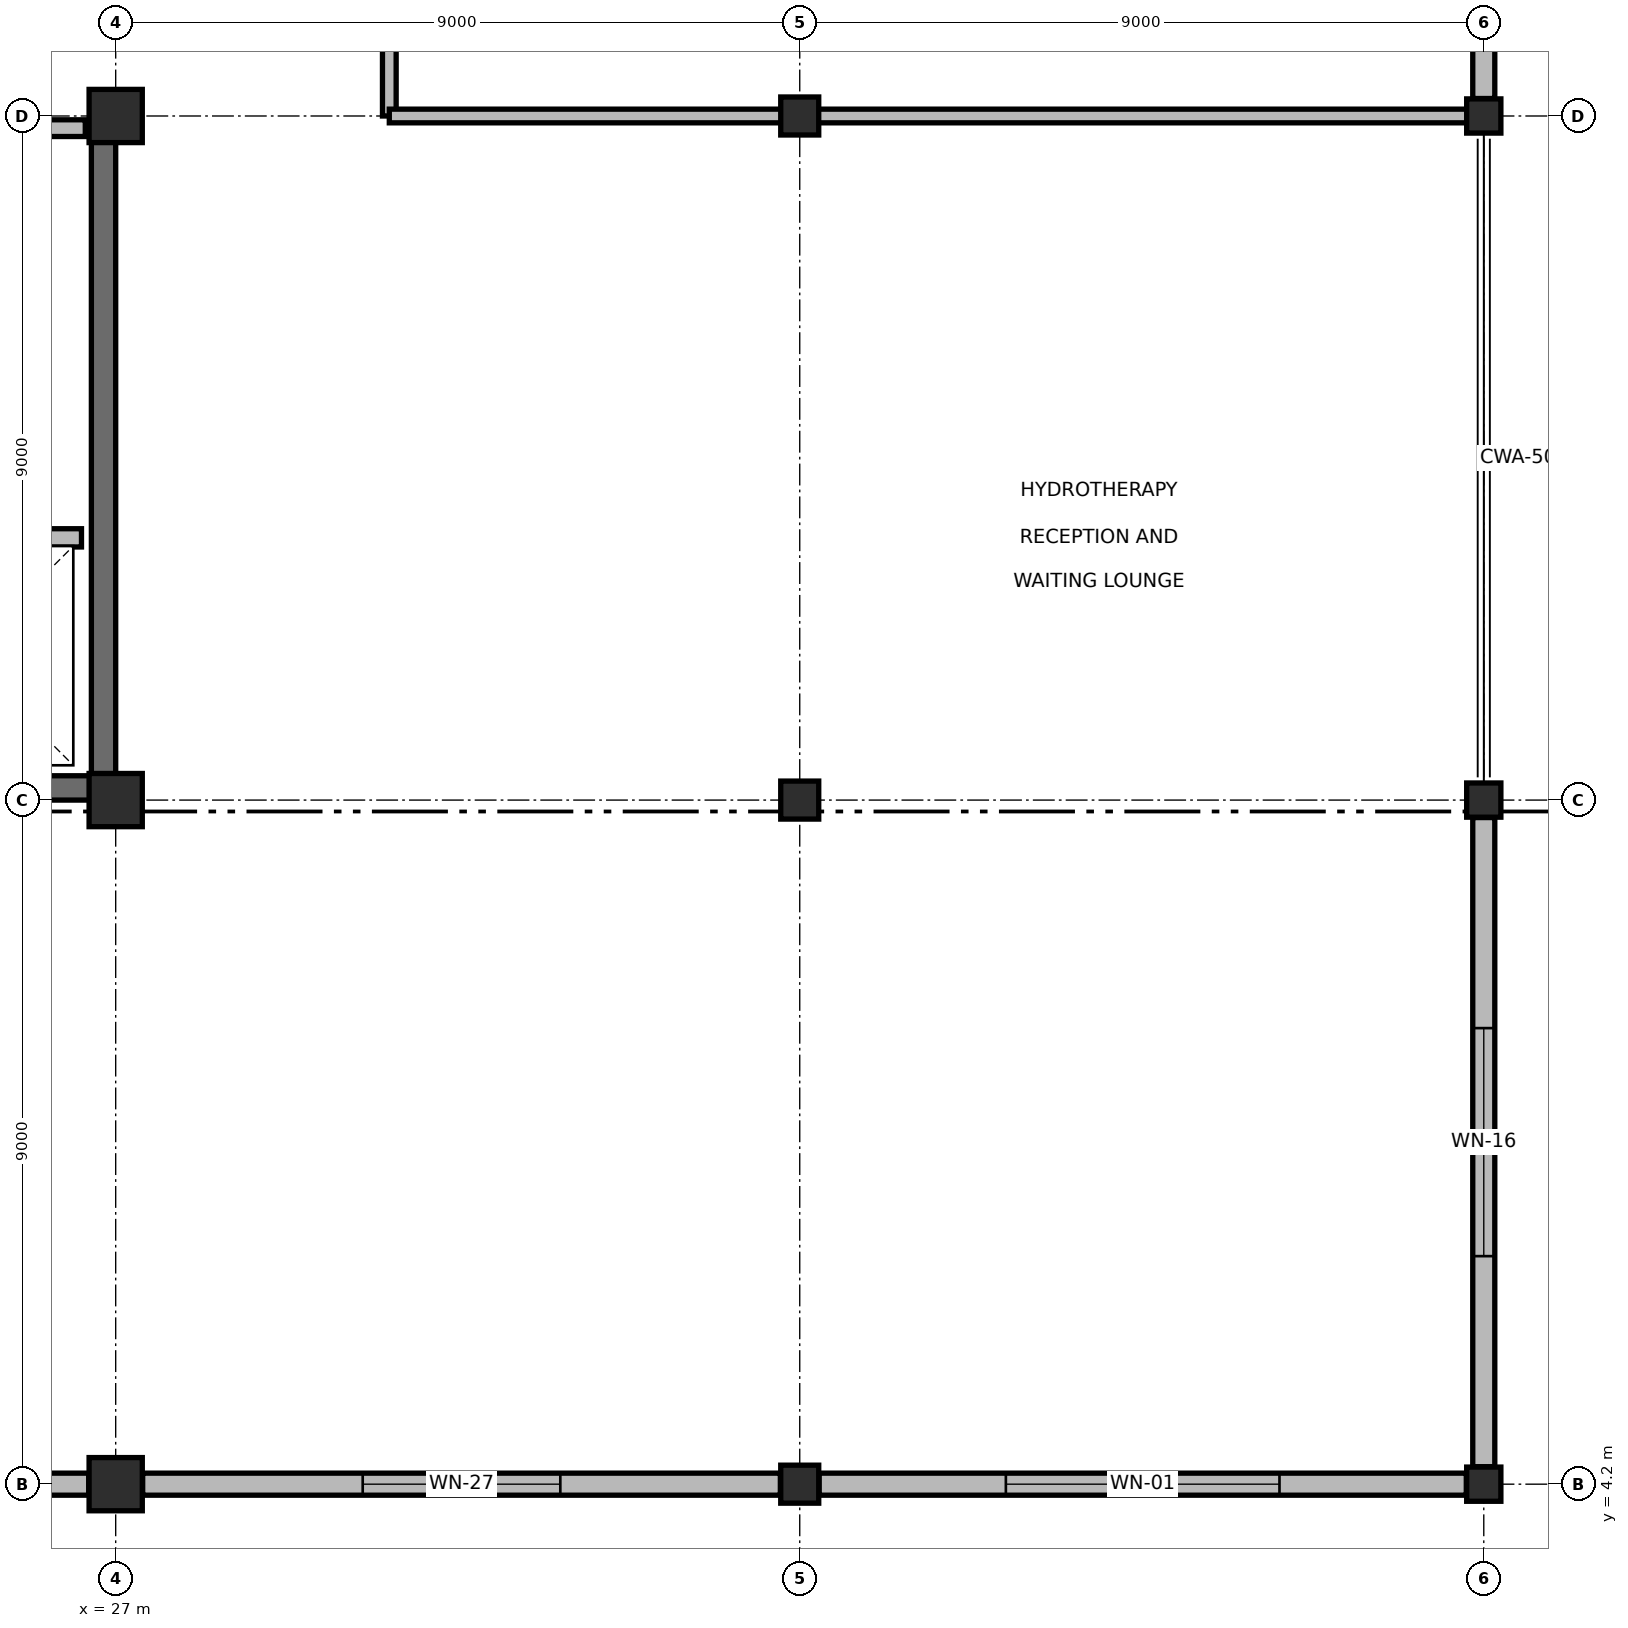
"""IFC4 building model, lengths in metres.
Left out: names, types, materials, properties, quantities, classifications, styles, units other than length and angle.
Written with IfcOpenShell. Run it as: python <this file> out.ifc"""

import sys

from ifc_helpers import new_model, si_unit, direction, frame, frame_2d, origin, origin_2d, place, context, subcontext, project, spatial, rectangle, extrude, element, fill, save


model = new_model("IFC4")
c1 = context("Model", 3, precision=1e-05, world=origin(), true_north=direction((0.0, 1.0)))
c2 = subcontext(c1, "Body", "Model", "MODEL_VIEW")
j1 = project(units=[si_unit("LENGTHUNIT", "METRE"), si_unit("PLANEANGLEUNIT", "RADIAN")], contexts=[c1])
p1 = place(None, origin())
s1 = spatial("IfcSite", under=j1, at=p1, CompositionType="ELEMENT")
p2 = place(p1, origin())
s2 = spatial("IfcBuilding", under=s1, at=p2, CompositionType="ELEMENT")
p3 = place(p2, frame((0.0, 0.0, 4.8)))
s3 = spatial("IfcBuildingStorey", under=s2, at=p3, CompositionType="ELEMENT", Elevation=4.8)
for number, where, z_axis, x_axis in (
    (1, (27.0, 4.2, 0.0), (0.0, 0.0, 1.0), (1.0, 0.0, 0.0)),
    (2, (27.0, 13.2, 0.0), (0.0, 0.0, 1.0), (1.0, 0.0, 0.0)),
    (3, (27.0, 22.2, 0.0), (0.0, 0.0, 1.0), (1.0, 0.0, 0.0)),
):
    element("IfcColumn", number, at=place(p3, frame(where, z_axis=z_axis, x_axis=x_axis)), inside=s3, PredefinedType="COLUMN", context=c2, shape_type="SweptSolid", body=[
        extrude(rectangle(XDim=0.7, YDim=0.7, at=origin_2d()), origin(), (0.0, 0.0, 1.0), 4.8),
    ])
for number, where, z_axis, x_axis in (
    (4, (36.0, 4.2, 0.0), (0.0, 0.0, 1.0), (1.0, 0.0, 0.0)),
    (5, (36.0, 13.2, 0.0), (0.0, 0.0, 1.0), (1.0, 0.0, 0.0)),
    (6, (36.0, 22.2, 0.0), (0.0, 0.0, 1.0), (1.0, 0.0, 0.0)),
):
    element("IfcColumn", number, at=place(p3, frame(where, z_axis=z_axis, x_axis=x_axis)), inside=s3, PredefinedType="COLUMN", context=c2, shape_type="SweptSolid", body=[
        extrude(rectangle(XDim=0.5, YDim=0.5, at=origin_2d()), origin(), (0.0, 0.0, 1.0), 4.8),
    ])
for number, where, z_axis, x_axis in (
    (7, (45.0, 4.2, 0.0), (0.0, 0.0, 1.0), (1.0, 0.0, 0.0)),
    (8, (45.0, 13.2, 0.0), (0.0, 0.0, 1.0), (1.0, 0.0, 0.0)),
    (9, (45.0, 22.2, 0.0), (0.0, 0.0, 1.0), (1.0, 0.0, 0.0)),
):
    element("IfcColumn", number, at=place(p3, frame(where, z_axis=z_axis, x_axis=x_axis)), inside=s3, PredefinedType="COLUMN", context=c2, shape_type="SweptSolid", body=[
        extrude(rectangle(XDim=0.45, YDim=0.45, at=origin_2d()), origin(), (0.0, 0.0, 1.0), 4.8),
    ])
p4 = place(p3, frame((9.0, 13.36, 0.0), z_axis=(0.0, 0.0, 1.0), x_axis=(1.0, 0.0, 0.0)))
e10 = element("IfcWall", 10, at=p4, inside=s3, PredefinedType="SHEAR", context=c2, shape_type="SweptSolid", body=[
    extrude(rectangle(XDim=18.0, YDim=0.32, at=frame_2d((9.0, 0.0))), origin(), (0.0, 0.0, 1.0), 4.8),
])
p5 = place(p3, frame((26.84, 13.52, 0.0), z_axis=(0.0, 0.0, 1.0), x_axis=(0.0, 1.0, 0.0)))
e11 = element("IfcWall", 11, at=p5, inside=s3, PredefinedType="SHEAR", context=c2, shape_type="SweptSolid", body=[
    extrude(rectangle(XDim=8.48, YDim=0.32, at=frame_2d((4.24, 0.0))), origin(), (0.0, 0.0, 1.0), 4.8),
])
p6 = place(p3, frame((26.645, 4.2, 0.0), z_axis=(0.0, 0.0, 1.0), x_axis=(-1.0, 0.0, 0.0)))
e12 = element("IfcWall", 12, at=p6, inside=s3, PredefinedType="SOLIDWALL", context=c2, shape_type="SweptSolid", body=[
    extrude(rectangle(XDim=8.29, YDim=0.29, at=frame_2d((4.145, 0.0))), origin(), (0.0, 0.0, 1.0), 3.825),
])
p7 = place(p6, frame((2.545, 0.0, 0.85)))
e13 = element("IfcOpeningElement", 13, at=p7, cuts=e12, PredefinedType="OPENING", context=c2, shape_type="SweptSolid", body=[
    extrude(rectangle(XDim=3.2, YDim=2.2, at=frame_2d((1.6, 1.1))), frame((0.0, 0.155, 0.0), z_axis=(0.0, -1.0, 0.0), x_axis=(1.0, 0.0, 0.0)), (0.0, 0.0, 1.0), 0.31),
])
p8 = place(p3, frame((35.745, 4.2, 0.0), z_axis=(0.0, 0.0, 1.0), x_axis=(-1.0, 0.0, 0.0)))
e14 = element("IfcWall", 14, at=p8, inside=s3, PredefinedType="SOLIDWALL", context=c2, shape_type="SweptSolid", body=[
    extrude(rectangle(XDim=8.39, YDim=0.29, at=frame_2d((4.195, 0.0))), origin(), (0.0, 0.0, 1.0), 3.825),
])
p9 = place(p8, frame((2.895, 0.0, 0.85)))
e15 = element("IfcOpeningElement", 15, at=p9, cuts=e14, PredefinedType="OPENING", context=c2, shape_type="SweptSolid", body=[
    extrude(rectangle(XDim=2.6, YDim=2.2, at=frame_2d((1.3, 1.1))), frame((0.0, 0.155, 0.0), z_axis=(0.0, -1.0, 0.0), x_axis=(1.0, 0.0, 0.0)), (0.0, 0.0, 1.0), 0.31),
])
p10 = place(p3, frame((44.77, 4.2, 0.0), z_axis=(0.0, 0.0, 1.0), x_axis=(-1.0, 0.0, 0.0)))
e16 = element("IfcWall", 16, at=p10, inside=s3, PredefinedType="SOLIDWALL", context=c2, shape_type="SweptSolid", body=[
    extrude(rectangle(XDim=8.515, YDim=0.29, at=frame_2d((4.258, 0.0))), origin(), (0.0, 0.0, 1.0), 3.825),
])
p11 = place(p10, frame((2.458, 0.0, 0.95)))
e17 = element("IfcOpeningElement", 17, at=p11, cuts=e16, PredefinedType="OPENING", context=c2, shape_type="SweptSolid", body=[
    extrude(rectangle(XDim=3.6, YDim=0.9, at=frame_2d((1.8, 0.45))), frame((0.0, 0.155, 0.0), z_axis=(0.0, -1.0, 0.0), x_axis=(1.0, 0.0, 0.0)), (0.0, 0.0, 1.0), 0.31),
])
p12 = place(p3, frame((45.0, 12.97, 0.0), z_axis=(0.0, 0.0, 1.0), x_axis=(0.0, -1.0, 0.0)))
e18 = element("IfcWall", 18, at=p12, inside=s3, PredefinedType="SOLIDWALL", context=c2, shape_type="SweptSolid", body=[
    extrude(rectangle(XDim=8.54, YDim=0.29, at=frame_2d((4.27, 0.0))), origin(), (0.0, 0.0, 1.0), 3.825),
])
p13 = place(p12, frame((2.77, 0.0, 0.85)))
e19 = element("IfcOpeningElement", 19, at=p13, cuts=e18, PredefinedType="OPENING", context=c2, shape_type="SweptSolid", body=[
    extrude(rectangle(XDim=3.0, YDim=1.8, at=frame_2d((1.5, 0.9))), frame((0.0, 0.155, 0.0), z_axis=(0.0, -1.0, 0.0), x_axis=(1.0, 0.0, 0.0)), (0.0, 0.0, 1.0), 0.31),
])
p14 = place(p3, frame((45.0, 28.57, 0.0), z_axis=(0.0, 0.0, 1.0), x_axis=(0.0, -1.0, 0.0)))
e20 = element("IfcWall", 20, at=p14, inside=s3, PredefinedType="SOLIDWALL", context=c2, shape_type="SweptSolid", body=[
    extrude(rectangle(XDim=6.14, YDim=0.29, at=frame_2d((3.07, 0.0))), origin(), (0.0, 0.0, 1.0), 3.825),
])
p15 = place(p14, frame((1.72, 0.0, 0.85)))
e21 = element("IfcOpeningElement", 21, at=p15, cuts=e20, PredefinedType="OPENING", context=c2, shape_type="SweptSolid", body=[
    extrude(rectangle(XDim=2.7, YDim=1.8, at=frame_2d((1.35, 0.9))), frame((0.0, 0.155, 0.0), z_axis=(0.0, -1.0, 0.0), x_axis=(1.0, 0.0, 0.0)), (0.0, 0.0, 1.0), 0.31),
])
p16 = place(p3, frame((23.45, 16.65, 0.0), z_axis=(0.0, 0.0, 1.0), x_axis=(1.0, 0.0, 0.0)))
e22 = element("IfcWall", 22, at=p16, inside=s3, PredefinedType="SOLIDWALL", context=c2, shape_type="SweptSolid", body=[
    extrude(rectangle(XDim=3.1, YDim=0.24, at=frame_2d((1.55, 0.0))), origin(), (0.0, 0.0, 1.0), 4.505),
])
p17 = place(p16, frame((0.95, 0.0, 0.0)))
e23 = element("IfcOpeningElement", 23, at=p17, cuts=e22, PredefinedType="OPENING", context=c2, shape_type="SweptSolid", body=[
    extrude(rectangle(XDim=1.2, YDim=2.2, at=frame_2d((0.6, 1.1))), frame((0.0, 0.13, 0.0), z_axis=(0.0, -1.0, 0.0), x_axis=(1.0, 0.0, 0.0)), (0.0, 0.0, 1.0), 0.26),
])
p18 = place(p3, frame((22.1, 22.04, 0.0), z_axis=(0.0, 0.0, 1.0), x_axis=(1.0, 0.0, 0.0)))
e24 = element("IfcWall", 24, at=p18, inside=s3, PredefinedType="PARTITIONING", context=c2, shape_type="SweptSolid", body=[
    extrude(rectangle(XDim=4.5, YDim=0.22, at=frame_2d((2.25, 0.0))), origin(), (0.0, 0.0, 1.0), 3.875),
])
p19 = place(p18, frame((1.1, 0.0, 0.0)))
e25 = element("IfcOpeningElement", 25, at=p19, cuts=e24, PredefinedType="OPENING", context=c2, shape_type="SweptSolid", body=[
    extrude(rectangle(XDim=1.8, YDim=2.2, at=frame_2d((0.9, 1.1))), frame((0.0, 0.12, 0.0), z_axis=(0.0, -1.0, 0.0), x_axis=(1.0, 0.0, 0.0)), (0.0, 0.0, 1.0), 0.24),
])
p20 = place(p3, frame((30.6, 22.2, 0.0), z_axis=(0.0, 0.0, 1.0), x_axis=(0.0, 1.0, 0.0)))
e26 = element("IfcWall", 26, at=p20, inside=s3, PredefinedType="PARTITIONING", context=c2, shape_type="SweptSolid", body=[
    extrude(rectangle(XDim=18.6, YDim=0.18, at=frame_2d((9.3, 0.0))), origin(), (0.0, 0.0, 1.0), 3.875),
])
p21 = place(p20, frame((10.982, 0.0, 0.0)))
e27 = element("IfcOpeningElement", 27, at=p21, cuts=e26, PredefinedType="OPENING", context=c2, shape_type="SweptSolid", body=[
    extrude(rectangle(XDim=1.1, YDim=2.15, at=frame_2d((0.55, 1.075))), frame((0.0, 0.1, 0.0), z_axis=(0.0, -1.0, 0.0), x_axis=(1.0, 0.0, 0.0)), (0.0, 0.0, 1.0), 0.2),
])
p22 = place(p3, frame((30.6, 22.2, 0.0), z_axis=(0.0, 0.0, 1.0), x_axis=(1.0, 0.0, 0.0)))
e28 = element("IfcWall", 28, at=p22, inside=s3, PredefinedType="PARTITIONING", context=c2, shape_type="SweptSolid", body=[
    extrude(rectangle(XDim=14.4, YDim=0.18, at=frame_2d((7.2, 0.0))), origin(), (0.0, 0.0, 1.0), 3.825),
])
p23 = place(p9, origin())
e29 = element("IfcWindow", 29, at=p23, inside=s3, PartitioningType="SINGLE_PANEL", PredefinedType="WINDOW", context=c2, shape_type="SweptSolid", body=[
    extrude(rectangle(XDim=2.6, YDim=2.2, at=frame_2d((1.3, 1.1))), frame((0.0, 0.03, 0.0), z_axis=(0.0, -1.0, 0.0), x_axis=(1.0, 0.0, 0.0)), (0.0, 0.0, 1.0), 0.06),
])
fill(e15, e29)
p24 = place(p11, origin())
e30 = element("IfcWindow", 30, at=p24, inside=s3, PartitioningType="SINGLE_PANEL", PredefinedType="WINDOW", context=c2, shape_type="SweptSolid", body=[
    extrude(rectangle(XDim=3.6, YDim=0.9, at=frame_2d((1.8, 0.45))), frame((0.0, 0.03, 0.0), z_axis=(0.0, -1.0, 0.0), x_axis=(1.0, 0.0, 0.0)), (0.0, 0.0, 1.0), 0.06),
])
fill(e17, e30)
p25 = place(p13, origin())
e31 = element("IfcWindow", 31, at=p25, inside=s3, PartitioningType="SINGLE_PANEL", PredefinedType="WINDOW", context=c2, shape_type="SweptSolid", body=[
    extrude(rectangle(XDim=3.0, YDim=1.8, at=frame_2d((1.5, 0.9))), frame((0.0, 0.03, 0.0), z_axis=(0.0, -1.0, 0.0), x_axis=(1.0, 0.0, 0.0)), (0.0, 0.0, 1.0), 0.06),
])
fill(e19, e31)
save(model, sys.argv[1])
